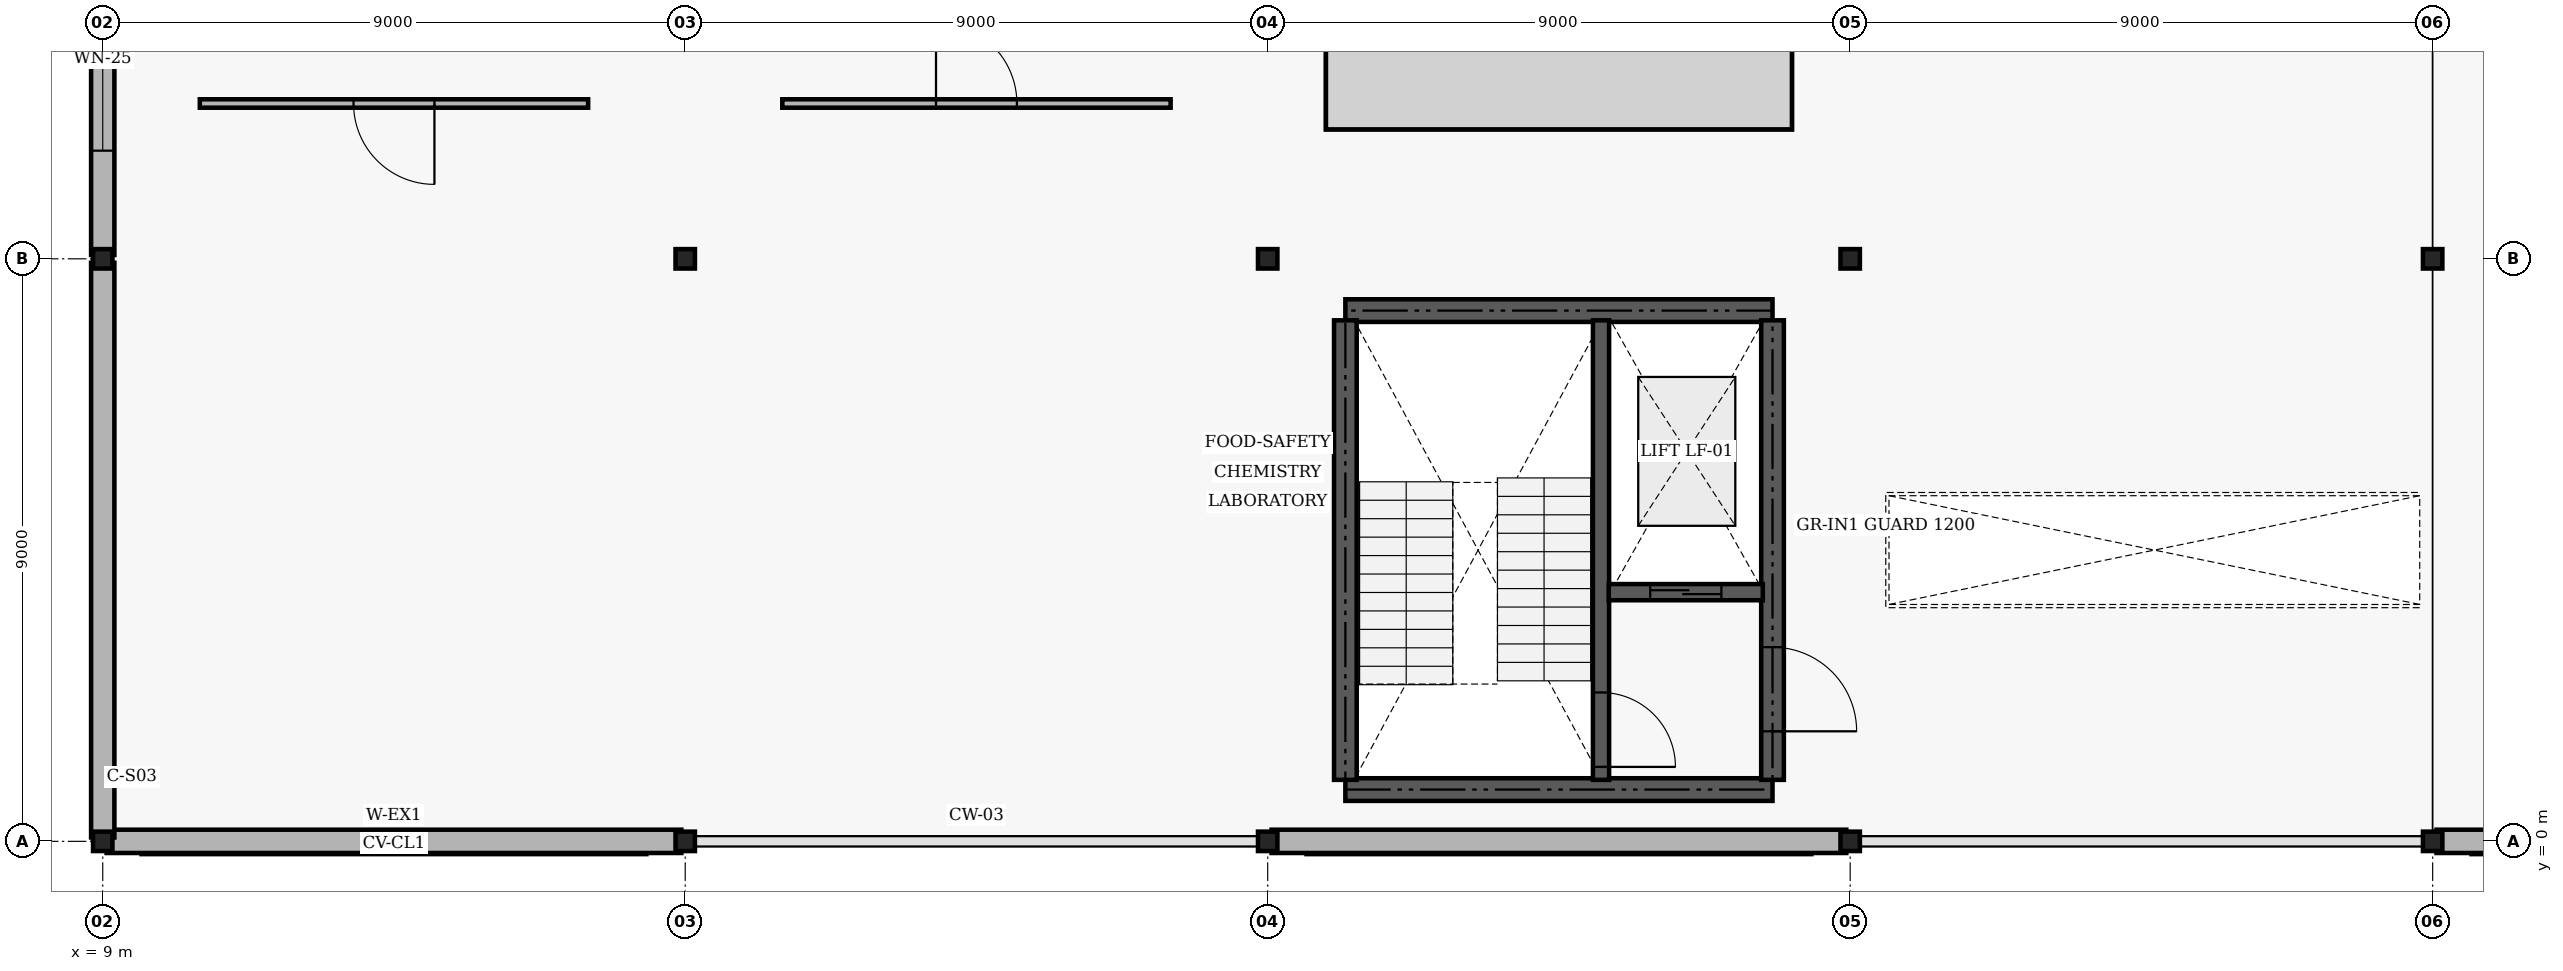
"""IFC4 building model, lengths in metres.
Left out: names, types, materials, properties, quantities, classifications, styles, units other than length and angle.
Written with IfcOpenShell. Run it as: python <this file> out.ifc"""

import sys

from ifc_helpers import new_model, si_unit, direction, frame, frame_2d, origin, origin_2d, place, context, subcontext, project, spatial, rectangle, i_section, extrude, element, fill, save


model = new_model("IFC4")
c1 = context("Model", 3, precision=1e-05, world=origin(), true_north=direction((0.0, 1.0)))
c2 = subcontext(c1, "Body", "Model", "MODEL_VIEW")
j1 = project(units=[si_unit("LENGTHUNIT", "METRE"), si_unit("PLANEANGLEUNIT", "RADIAN")], contexts=[c1])
p1 = place(None, origin())
s1 = spatial("IfcSite", under=j1, at=p1, CompositionType="ELEMENT")
p2 = place(p1, origin())
s2 = spatial("IfcBuilding", under=s1, at=p2, CompositionType="ELEMENT")
p3 = place(p2, frame((0.0, 0.0, 9.6)))
s3 = spatial("IfcBuildingStorey", under=s2, at=p3, CompositionType="ELEMENT", Elevation=9.6)
for number, where, z_axis, x_axis in (
    (1, (9.0, 0.0, 0.0), (0.0, 0.0, 1.0), (1.0, 0.0, 0.0)),
    (2, (9.0, 9.0, 0.0), (0.0, 0.0, 1.0), (1.0, 0.0, 0.0)),
    (3, (18.0, 0.0, 0.0), (0.0, 0.0, 1.0), (1.0, 0.0, 0.0)),
    (4, (18.0, 9.0, 0.0), (0.0, 0.0, 1.0), (1.0, 0.0, 0.0)),
    (5, (27.0, 0.0, 0.0), (0.0, 0.0, 1.0), (1.0, 0.0, 0.0)),
    (6, (27.0, 9.0, 0.0), (0.0, 0.0, 1.0), (1.0, 0.0, 0.0)),
    (7, (36.0, 0.0, 0.0), (0.0, 0.0, 1.0), (1.0, 0.0, 0.0)),
    (8, (36.0, 9.0, 0.0), (0.0, 0.0, 1.0), (1.0, 0.0, 0.0)),
    (9, (45.0, 0.0, 0.0), (0.0, 0.0, 1.0), (1.0, 0.0, 0.0)),
    (10, (45.0, 9.0, 0.0), (0.0, 0.0, 1.0), (1.0, 0.0, 0.0)),
):
    element("IfcColumn", number, at=place(p3, frame(where, z_axis=z_axis, x_axis=x_axis)), inside=s3, PredefinedType="COLUMN", context=c2, shape_type="SweptSolid", body=[
        extrude(i_section(OverallWidth=0.3, OverallDepth=0.3, WebThickness=0.011, FlangeThickness=0.019, FilletRadius=0.027, at=origin_2d()), origin(), (0.0, 0.0, 1.0), 3.9),
    ])
for number, where, z_axis, x_axis in (
    (11, (9.06, 0.0, 0.0), (0.0, 0.0, 1.0), (1.0, 0.0, 0.0)),
    (12, (27.06, 0.0, 0.0), (0.0, 0.0, 1.0), (1.0, 0.0, 0.0)),
    (13, (45.06, 0.0, 0.0), (0.0, 0.0, 1.0), (1.0, 0.0, 0.0)),
    (14, (9.0, 0.06, 0.0), (0.0, 0.0, 1.0), (0.0, 1.0, 0.0)),
):
    element("IfcWall", number, at=place(p3, frame(where, z_axis=z_axis, x_axis=x_axis)), inside=s3, PredefinedType="SOLIDWALL", context=c2, shape_type="SweptSolid", body=[
        extrude(rectangle(XDim=8.88, YDim=0.36, at=frame_2d((4.44, 0.0))), origin(), (0.0, 0.0, 1.0), 3.25),
    ])
p4 = place(p3, frame((9.0, 9.06, 0.0), z_axis=(0.0, 0.0, 1.0), x_axis=(0.0, 1.0, 0.0)))
e15 = element("IfcWall", 15, at=p4, inside=s3, PredefinedType="SOLIDWALL", context=c2, shape_type="SweptSolid", body=[
    extrude(rectangle(XDim=8.88, YDim=0.36, at=frame_2d((4.44, 0.0))), origin(), (0.0, 0.0, 1.0), 3.25),
])
p5 = place(p4, frame((1.611, 0.0, 0.9)))
e16 = element("IfcOpeningElement", 16, at=p5, cuts=e15, PredefinedType="OPENING", context=c2, shape_type="SweptSolid", body=[
    extrude(rectangle(XDim=1.75, YDim=2.25, at=frame_2d((0.875, 1.125))), frame((0.0, 0.19, 0.0), z_axis=(0.0, -1.0, 0.0), x_axis=(1.0, 0.0, 0.0)), (0.0, 0.0, 1.0), 0.38),
])
p6 = place(p4, frame((5.519, 0.0, 0.9)))
e17 = element("IfcOpeningElement", 17, at=p6, cuts=e15, PredefinedType="OPENING", context=c2, shape_type="SweptSolid", body=[
    extrude(rectangle(XDim=1.75, YDim=2.25, at=frame_2d((0.875, 1.125))), frame((0.0, 0.19, 0.0), z_axis=(0.0, -1.0, 0.0), x_axis=(1.0, 0.0, 0.0)), (0.0, 0.0, 1.0), 0.38),
])
for number, where, z_axis, x_axis in (
    (18, (28.2, 0.8, 0.0), (0.0, 0.0, 1.0), (1.0, 0.0, 0.0)),
    (19, (28.2, 8.2, 0.0), (0.0, 0.0, 1.0), (1.0, 0.0, 0.0)),
):
    element("IfcWall", number, at=place(p3, frame(where, z_axis=z_axis, x_axis=x_axis)), inside=s3, PredefinedType="SHEAR", context=c2, shape_type="SweptSolid", body=[
        extrude(rectangle(XDim=6.6, YDim=0.35, at=frame_2d((3.3, 0.0))), origin(), (0.0, 0.0, 1.0), 3.9),
    ])
p7 = place(p3, frame((28.2, 0.95, 0.0), z_axis=(0.0, 0.0, 1.0), x_axis=(0.0, 1.0, 0.0)))
e20 = element("IfcWall", 20, at=p7, inside=s3, PredefinedType="SHEAR", context=c2, shape_type="SweptSolid", body=[
    extrude(rectangle(XDim=7.1, YDim=0.35, at=frame_2d((3.55, 0.0))), origin(), (0.0, 0.0, 1.0), 3.9),
])
p8 = place(p3, frame((34.8, 0.95, 0.0), z_axis=(0.0, 0.0, 1.0), x_axis=(0.0, 1.0, 0.0)))
e21 = element("IfcWall", 21, at=p8, inside=s3, PredefinedType="SHEAR", context=c2, shape_type="SweptSolid", body=[
    extrude(rectangle(XDim=7.1, YDim=0.35, at=frame_2d((3.55, 0.0))), origin(), (0.0, 0.0, 1.0), 3.9),
])
p9 = place(p8, frame((0.75, 0.0, 0.0)))
e22 = element("IfcOpeningElement", 22, at=p9, cuts=e21, PredefinedType="OPENING", context=c2, shape_type="SweptSolid", body=[
    extrude(rectangle(XDim=1.3, YDim=2.15, at=frame_2d((0.65, 1.075))), frame((0.0, 0.185, 0.0), z_axis=(0.0, -1.0, 0.0), x_axis=(1.0, 0.0, 0.0)), (0.0, 0.0, 1.0), 0.37),
])
p10 = place(p3, frame((32.15, 0.95, 0.0), z_axis=(0.0, 0.0, 1.0), x_axis=(0.0, 1.0, 0.0)))
e23 = element("IfcWall", 23, at=p10, inside=s3, PredefinedType="SHEAR", context=c2, shape_type="SweptSolid", body=[
    extrude(rectangle(XDim=7.1, YDim=0.25, at=frame_2d((3.55, 0.0))), origin(), (0.0, 0.0, 1.0), 3.9),
])
p11 = place(p10, frame((0.2, 0.0, 0.0)))
e24 = element("IfcOpeningElement", 24, at=p11, cuts=e23, PredefinedType="OPENING", context=c2, shape_type="SweptSolid", body=[
    extrude(rectangle(XDim=1.15, YDim=2.15, at=frame_2d((0.575, 1.075))), frame((0.0, 0.135, 0.0), z_axis=(0.0, -1.0, 0.0), x_axis=(1.0, 0.0, 0.0)), (0.0, 0.0, 1.0), 0.27),
])
p12 = place(p3, frame((32.27, 3.85, 0.0), z_axis=(0.0, 0.0, 1.0), x_axis=(1.0, 0.0, 0.0)))
e25 = element("IfcWall", 25, at=p12, inside=s3, PredefinedType="SHEAR", context=c2, shape_type="SweptSolid", body=[
    extrude(rectangle(XDim=2.38, YDim=0.25, at=frame_2d((1.19, 0.0))), origin(), (0.0, 0.0, 1.0), 3.9),
])
p13 = place(p12, frame((0.64, 0.0, 0.0)))
e26 = element("IfcOpeningElement", 26, at=p13, cuts=e25, PredefinedType="OPENING", context=c2, shape_type="SweptSolid", body=[
    extrude(rectangle(XDim=1.1, YDim=2.15, at=frame_2d((0.55, 1.075))), frame((0.0, 0.135, 0.0), z_axis=(0.0, -1.0, 0.0), x_axis=(1.0, 0.0, 0.0)), (0.0, 0.0, 1.0), 0.27),
])
p14 = place(p3, frame((10.5, 11.4, 0.0), z_axis=(0.0, 0.0, 1.0), x_axis=(1.0, 0.0, 0.0)))
e27 = element("IfcWall", 27, at=p14, inside=s3, PredefinedType="PARTITIONING", context=c2, shape_type="SweptSolid", body=[
    extrude(rectangle(XDim=6.0, YDim=0.13, at=frame_2d((3.0, 0.0))), origin(), (0.0, 0.0, 1.0), 2.9),
])
p15 = place(p14, frame((2.375, 0.0, 0.0)))
e28 = element("IfcOpeningElement", 28, at=p15, cuts=e27, PredefinedType="OPENING", context=c2, shape_type="SweptSolid", body=[
    extrude(rectangle(XDim=1.25, YDim=2.15, at=frame_2d((0.625, 1.075))), frame((0.0, 0.075, 0.0), z_axis=(0.0, -1.0, 0.0), x_axis=(1.0, 0.0, 0.0)), (0.0, 0.0, 1.0), 0.15),
])
p16 = place(p3, frame((19.5, 11.4, 0.0), z_axis=(0.0, 0.0, 1.0), x_axis=(1.0, 0.0, 0.0)))
e29 = element("IfcWall", 29, at=p16, inside=s3, PredefinedType="PARTITIONING", context=c2, shape_type="SweptSolid", body=[
    extrude(rectangle(XDim=6.0, YDim=0.13, at=frame_2d((3.0, 0.0))), origin(), (0.0, 0.0, 1.0), 2.9),
])
p17 = place(p16, frame((2.375, 0.0, 0.0)))
e30 = element("IfcOpeningElement", 30, at=p17, cuts=e29, PredefinedType="OPENING", context=c2, shape_type="SweptSolid", body=[
    extrude(rectangle(XDim=1.25, YDim=2.15, at=frame_2d((0.625, 1.075))), frame((0.0, 0.075, 0.0), z_axis=(0.0, -1.0, 0.0), x_axis=(1.0, 0.0, 0.0)), (0.0, 0.0, 1.0), 0.15),
])
p18 = place(p5, origin())
e31 = element("IfcWindow", 31, at=p18, inside=s3, PartitioningType="SINGLE_PANEL", PredefinedType="WINDOW", context=c2, shape_type="SweptSolid", body=[
    extrude(rectangle(XDim=1.75, YDim=2.25, at=frame_2d((0.875, 1.125))), frame((0.0, 0.03, 0.0), z_axis=(0.0, -1.0, 0.0), x_axis=(1.0, 0.0, 0.0)), (0.0, 0.0, 1.0), 0.06),
])
fill(e16, e31)
p19 = place(p9, frame((1.3, 0.0, 0.0), z_axis=(0.0, 0.0, 1.0), x_axis=(-1.0, 0.0, 0.0)))
e32 = element("IfcDoor", 32, at=p19, inside=s3, OperationType="DOUBLE_DOOR_SINGLE_SWING", PredefinedType="DOOR", context=c2, shape_type="SweptSolid", body=[
    extrude(rectangle(XDim=1.3, YDim=2.15, at=frame_2d((0.65, 1.075))), frame((0.0, 0.025, 0.0), z_axis=(0.0, -1.0, 0.0), x_axis=(1.0, 0.0, 0.0)), (0.0, 0.0, 1.0), 0.05),
])
fill(e22, e32)
p20 = place(p11, frame((1.15, 0.0, 0.0), z_axis=(0.0, 0.0, 1.0), x_axis=(-1.0, 0.0, 0.0)))
e33 = element("IfcDoor", 33, at=p20, inside=s3, OperationType="SINGLE_SWING_LEFT", PredefinedType="DOOR", context=c2, shape_type="SweptSolid", body=[
    extrude(rectangle(XDim=1.15, YDim=2.15, at=frame_2d((0.575, 1.075))), frame((0.0, 0.025, 0.0), z_axis=(0.0, -1.0, 0.0), x_axis=(1.0, 0.0, 0.0)), (0.0, 0.0, 1.0), 0.05),
])
fill(e24, e33)
p21 = place(p13, origin())
e34 = element("IfcDoor", 34, at=p21, inside=s3, OperationType="SLIDING_TO_LEFT", PredefinedType="DOOR", context=c2, shape_type="SweptSolid", body=[
    extrude(rectangle(XDim=1.1, YDim=2.15, at=frame_2d((0.55, 1.075))), frame((0.0, 0.025, 0.0), z_axis=(0.0, -1.0, 0.0), x_axis=(1.0, 0.0, 0.0)), (0.0, 0.0, 1.0), 0.05),
])
fill(e26, e34)
p22 = place(p15, origin())
e35 = element("IfcDoor", 35, at=p22, inside=s3, OperationType="SINGLE_SWING_RIGHT", PredefinedType="DOOR", context=c2, shape_type="SweptSolid", body=[
    extrude(rectangle(XDim=1.25, YDim=2.15, at=frame_2d((0.625, 1.075))), frame((0.0, 0.025, 0.0), z_axis=(0.0, -1.0, 0.0), x_axis=(1.0, 0.0, 0.0)), (0.0, 0.0, 1.0), 0.05),
])
fill(e28, e35)
p23 = place(p17, origin())
e36 = element("IfcDoor", 36, at=p23, inside=s3, OperationType="SINGLE_SWING_LEFT", PredefinedType="DOOR", context=c2, shape_type="SweptSolid", body=[
    extrude(rectangle(XDim=1.25, YDim=2.15, at=frame_2d((0.625, 1.075))), frame((0.0, 0.025, 0.0), z_axis=(0.0, -1.0, 0.0), x_axis=(1.0, 0.0, 0.0)), (0.0, 0.0, 1.0), 0.05),
])
fill(e30, e36)
save(model, sys.argv[1])
